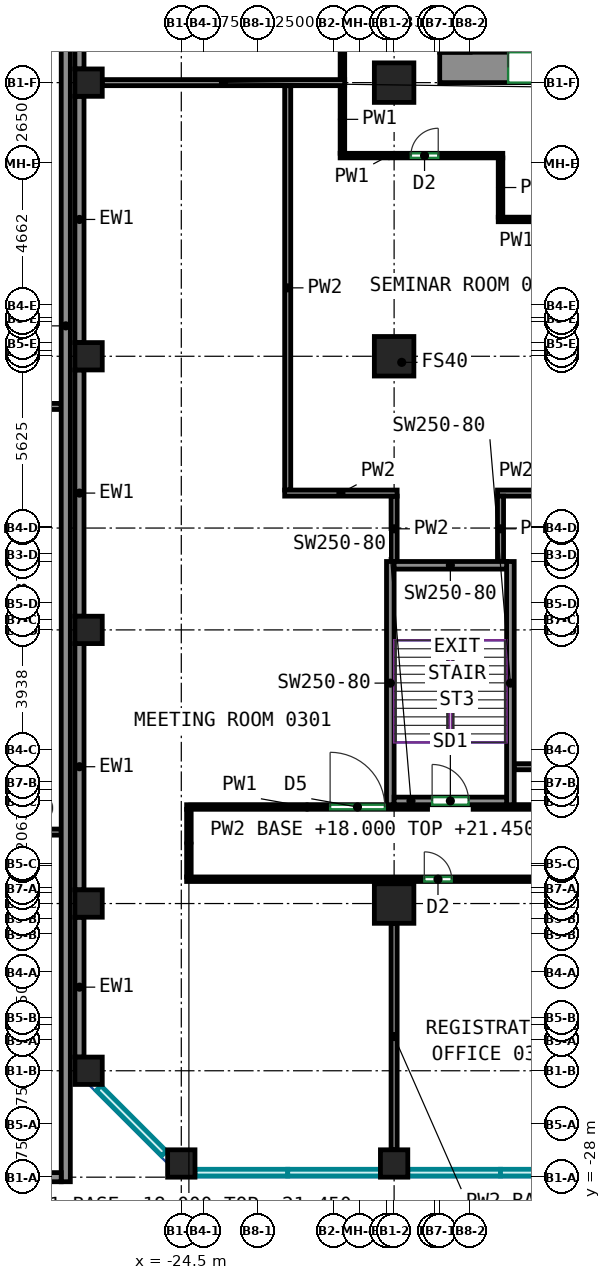
"""IFC4 building model, lengths in metres.
Left out: names, types, materials, properties, quantities, classifications, styles, units other than length and angle.
Written with IfcOpenShell. Run it as: python <this file> out.ifc"""

import sys

from ifc_helpers import new_model, si_unit, direction, frame, frame_2d, origin, origin_2d, place, context, subcontext, project, spatial, rectangle, extrude, source, transform, mapped, element, fill, save


model = new_model("IFC4")
c1 = context("Model", 3, precision=1e-05, world=origin(), true_north=direction((0.0, 1.0)))
c2 = subcontext(c1, "Body", "Model", "MODEL_VIEW")
j1 = project(units=[si_unit("LENGTHUNIT", "METRE"), si_unit("PLANEANGLEUNIT", "RADIAN")], contexts=[c1])
p1 = place(None, origin())
s1 = spatial("IfcSite", under=j1, at=p1, CompositionType="ELEMENT")
p2 = place(p1, origin())
s2 = spatial("IfcBuilding", under=s1, at=p2, CompositionType="ELEMENT")
p3 = place(p2, frame((0.0, 0.0, 18.0)))
s3 = spatial("IfcBuildingStorey", under=s2, at=p3, CompositionType="ELEMENT", Elevation=18.0)
m1 = source(origin(), c2, "Body", "SweptSolid", [
    extrude(rectangle(XDim=0.9, YDim=0.9, at=origin_2d()), origin(), (0.0, 0.0, 1.0), 4.1),
])
for number, where, z_axis, x_axis in (
    (1, (-27.55, -24.5, 0.0), (0.0, 0.0, 1.0), (1.0, 0.0, 0.0)),
    (2, (-27.55, -19.0, 0.0), (0.0, 0.0, 1.0), (1.0, 0.0, 0.0)),
    (3, (-27.55, -10.0, 0.0), (0.0, 0.0, 1.0), (1.0, 0.0, 0.0)),
    (4, (-27.55, -1.0, 0.0), (0.0, 0.0, 1.0), (1.0, 0.0, 0.0)),
    (5, (-27.55, 8.0, 0.0), (0.0, 0.0, 1.0), (1.0, 0.0, 0.0)),
    (6, (-24.5, -27.55, 0.0), (0.0, 0.0, 1.0), (1.0, 0.0, 0.0)),
    (7, (-17.5, -27.55, 0.0), (0.0, 0.0, 1.0), (1.0, 0.0, 0.0)),
):
    element("IfcColumn", number, at=place(p3, frame(where, z_axis=z_axis, x_axis=x_axis)), inside=s3, PredefinedType="COLUMN", context=c2, shape_type="MappedRepresentation", body=[
        mapped(m1, transform((0.0, 0.0, 0.0))),
    ])
m2 = source(origin(), c2, "Body", "SweptSolid", [
    extrude(rectangle(XDim=1.3, YDim=1.3, at=origin_2d()), origin(), (0.0, 0.0, 1.0), 4.1),
])
for number, where, z_axis, x_axis in (
    (8, (-17.5, -19.0, 0.0), (0.0, 0.0, 1.0), (1.0, 0.0, 0.0)),
    (9, (-17.5, -1.0, 0.0), (0.0, 0.0, 1.0), (1.0, 0.0, 0.0)),
    (10, (-17.5, 8.0, 0.0), (0.0, 0.0, 1.0), (1.0, 0.0, 0.0)),
):
    element("IfcColumn", number, at=place(p3, frame(where, z_axis=z_axis, x_axis=x_axis)), inside=s3, PredefinedType="COLUMN", context=c2, shape_type="MappedRepresentation", body=[
        mapped(m2, transform((0.0, 0.0, 0.0))),
    ])
m3 = source(origin(), c2, "Body", "SweptSolid", [
    extrude(rectangle(XDim=5.63, YDim=1.0, at=frame_2d((2.815, 0.0))), origin(), (0.0, 0.0, 1.0), 4.1),
])
p4 = place(p3, frame((-16.0, 8.5, 0.0), z_axis=(0.0, 0.0, 1.0), x_axis=(1.0, 0.0, 0.0)))
e11 = element("IfcWall", 11, at=p4, inside=s3, PredefinedType="SHEAR", context=c2, shape_type="MappedRepresentation", body=[
    mapped(m3, transform((0.0, 0.0, 0.0))),
])
p5 = place(p4, frame((2.25, 0.0, 0.0)))
e12 = element("IfcOpeningElement", 12, at=p5, cuts=e11, PredefinedType="OPENING", context=c2, shape_type="SweptSolid", body=[
    extrude(rectangle(XDim=1.2, YDim=2.1, at=frame_2d((0.6, 1.05))), frame((0.0, 0.51, 0.0), z_axis=(0.0, -1.0, 0.0), x_axis=(1.0, 0.0, 0.0)), (0.0, 0.0, 1.0), 1.02),
])
m4 = source(origin(), c2, "Body", "SweptSolid", [
    extrude(rectangle(XDim=8.0, YDim=0.25, at=frame_2d((4.0, 0.0))), origin(), (0.0, 0.0, 1.0), 4.1),
])
for number, where, z_axis, x_axis in (
    (13, (-17.625, -15.75, 0.0), (0.0, 0.0, 1.0), (0.0, 1.0, 0.0)),
    (14, (-13.675, -15.75, 0.0), (0.0, 0.0, 1.0), (0.0, 1.0, 0.0)),
):
    element("IfcWall", number, at=place(p3, frame(where, z_axis=z_axis, x_axis=x_axis)), inside=s3, PredefinedType="SHEAR", context=c2, shape_type="MappedRepresentation", body=[
        mapped(m4, transform((0.0, 0.0, 0.0))),
    ])
m5 = source(origin(), c2, "Body", "SweptSolid", [
    extrude(rectangle(XDim=3.7, YDim=0.25, at=frame_2d((1.85, 0.0))), origin(), (0.0, 0.0, 1.0), 4.1),
])
p6 = place(p3, frame((-17.5, -15.625, 0.0), z_axis=(0.0, 0.0, 1.0), x_axis=(1.0, 0.0, 0.0)))
e15 = element("IfcWall", 15, at=p6, inside=s3, PredefinedType="SHEAR", context=c2, shape_type="MappedRepresentation", body=[
    mapped(m5, transform((0.0, 0.0, 0.0))),
])
p7 = place(p6, frame((1.25, 0.0, 0.0)))
e16 = element("IfcOpeningElement", 16, at=p7, cuts=e15, PredefinedType="OPENING", context=c2, shape_type="SweptSolid", body=[
    extrude(rectangle(XDim=1.2, YDim=2.1, at=frame_2d((0.6, 1.05))), frame((0.0, 0.135, 0.0), z_axis=(0.0, -1.0, 0.0), x_axis=(1.0, 0.0, 0.0)), (0.0, 0.0, 1.0), 0.27),
])
p8 = place(p3, frame((-17.5, -7.875, 0.0), z_axis=(0.0, 0.0, 1.0), x_axis=(1.0, 0.0, 0.0)))
e17 = element("IfcWall", 17, at=p8, inside=s3, PredefinedType="SHEAR", context=c2, shape_type="MappedRepresentation", body=[
    mapped(m5, transform((0.0, 0.0, 0.0))),
])
m6 = source(origin(), c2, "Body", "SweptSolid", [
    extrude(rectangle(XDim=15.282, YDim=0.3, at=frame_2d((7.641, 0.0))), origin(), (0.0, 0.0, 1.0), 4.1),
])
p9 = place(p3, frame((-27.85, 23.732, 0.0), z_axis=(0.0, 0.0, 1.0), x_axis=(0.0, -1.0, 0.0)))
e18 = element("IfcWall", 18, at=p9, inside=s3, PredefinedType="SOLIDWALL", context=c2, shape_type="MappedRepresentation", body=[
    mapped(m6, transform((0.0, 0.0, 0.0))),
])
m7 = source(origin(), c2, "Body", "SweptSolid", [
    extrude(rectangle(XDim=8.1, YDim=0.3, at=frame_2d((4.05, 0.0))), origin(), (0.0, 0.0, 1.0), 4.1),
])
for number, where, z_axis, x_axis in (
    (19, (-27.85, 7.55, 0.0), (0.0, 0.0, 1.0), (0.0, -1.0, 0.0)),
    (20, (-27.85, -1.45, 0.0), (0.0, 0.0, 1.0), (0.0, -1.0, 0.0)),
    (21, (-27.85, -10.45, 0.0), (0.0, 0.0, 1.0), (0.0, -1.0, 0.0)),
):
    element("IfcWall", number, at=place(p3, frame(where, z_axis=z_axis, x_axis=x_axis)), inside=s3, PredefinedType="SOLIDWALL", context=c2, shape_type="MappedRepresentation", body=[
        mapped(m7, transform((0.0, 0.0, 0.0))),
    ])
m8 = source(origin(), c2, "Body", "SweptSolid", [
    extrude(rectangle(XDim=4.6, YDim=0.3, at=frame_2d((2.3, 0.0))), origin(), (0.0, 0.0, 1.0), 4.1),
])
p10 = place(p3, frame((-27.85, -19.45, 0.0), z_axis=(0.0, 0.0, 1.0), x_axis=(0.0, -1.0, 0.0)))
e22 = element("IfcWall", 22, at=p10, inside=s3, PredefinedType="SOLIDWALL", context=c2, shape_type="MappedRepresentation", body=[
    mapped(m8, transform((0.0, 0.0, 0.0))),
])
m9 = source(origin(), c2, "Body", "SweptSolid", [
    extrude(rectangle(XDim=56.3, YDim=0.3, at=frame_2d((28.15, 0.0))), origin(), (0.0, 0.0, 1.0), 4.1),
])
p11 = place(p3, frame((-28.3, 28.15, 0.0), z_axis=(0.0, 0.0, 1.0), x_axis=(0.0, -1.0, 0.0)))
e23 = element("IfcWall", 23, at=p11, inside=s3, PredefinedType="SOLIDWALL", context=c2, shape_type="MappedRepresentation", body=[
    mapped(m9, transform((0.0, 0.0, 0.0))),
])
m10 = source(origin(), c2, "Body", "SweptSolid", [
    extrude(rectangle(XDim=8.0, YDim=0.3, at=frame_2d((4.0, 0.0))), origin(), (0.0, 0.0, 1.0), 4.1),
])
p12 = place(p3, frame((-28.45, -28.0, 0.0), z_axis=(0.0, 0.0, 1.0), x_axis=(-1.0, 0.0, 0.0)))
e24 = element("IfcWall", 24, at=p12, inside=s3, PredefinedType="SOLIDWALL", context=c2, shape_type="MappedRepresentation", body=[
    mapped(m10, transform((0.0, 0.0, 0.0))),
])
p13 = place(p12, frame((2.8, 0.0, 0.9)))
e25 = element("IfcOpeningElement", 25, at=p13, cuts=e24, PredefinedType="OPENING", context=c2, shape_type="SweptSolid", body=[
    extrude(rectangle(XDim=2.4, YDim=1.8, at=frame_2d((1.2, 0.9))), frame((0.0, 0.16, 0.0), z_axis=(0.0, -1.0, 0.0), x_axis=(1.0, 0.0, 0.0)), (0.0, 0.0, 1.0), 0.32),
])
p14 = place(p3, frame((-14.075, 3.5, 0.0), z_axis=(0.0, 0.0, 1.0), x_axis=(1.0, 0.0, 0.0)))
e26 = element("IfcWall", 26, at=p14, inside=s3, PredefinedType="PARTITIONING", context=c2, shape_type="SweptSolid", body=[
    extrude(rectangle(XDim=3.65, YDim=0.15, at=frame_2d((1.825, 0.0))), origin(), (0.0, 0.0, 1.0), 4.1),
])
p15 = place(p3, frame((-14.0, 5.525, 0.0), z_axis=(0.0, 0.0, 1.0), x_axis=(0.0, -1.0, 0.0)))
e27 = element("IfcWall", 27, at=p15, inside=s3, PredefinedType="PARTITIONING", context=c2, shape_type="SweptSolid", body=[
    extrude(rectangle(XDim=1.95, YDim=0.15, at=frame_2d((0.975, 0.0))), origin(), (0.0, 0.0, 1.0), 4.1),
])
p16 = place(p3, frame((-19.275, 5.6, 0.0), z_axis=(0.0, 0.0, 1.0), x_axis=(1.0, 0.0, 0.0)))
e28 = element("IfcWall", 28, at=p16, inside=s3, PredefinedType="PARTITIONING", context=c2, shape_type="SweptSolid", body=[
    extrude(rectangle(XDim=5.35, YDim=0.15, at=frame_2d((2.675, 0.0))), origin(), (0.0, 0.0, 1.0), 4.1),
])
p17 = place(p16, frame((2.326, 0.0, 0.0)))
e29 = element("IfcOpeningElement", 29, at=p17, cuts=e28, PredefinedType="OPENING", context=c2, shape_type="SweptSolid", body=[
    extrude(rectangle(XDim=0.9, YDim=2.1, at=frame_2d((0.45, 1.05))), frame((0.0, 0.085, 0.0), z_axis=(0.0, -1.0, 0.0), x_axis=(1.0, 0.0, 0.0)), (0.0, 0.0, 1.0), 0.17),
])
p18 = place(p3, frame((-19.2, 5.675, 0.0), z_axis=(0.0, 0.0, 1.0), x_axis=(0.0, 1.0, 0.0)))
e30 = element("IfcWall", 30, at=p18, inside=s3, PredefinedType="PARTITIONING", context=c2, shape_type="SweptSolid", body=[
    extrude(rectangle(XDim=2.235, YDim=0.15, at=frame_2d((1.117, 0.0))), origin(), (0.0, 0.0, 1.0), 4.1),
])
p19 = place(p3, frame((-24.325, -18.2, 0.0), z_axis=(0.0, 0.0, 1.0), x_axis=(1.0, 0.0, 0.0)))
e31 = element("IfcWall", 31, at=p19, inside=s3, PredefinedType="PARTITIONING", context=c2, shape_type="SweptSolid", body=[
    extrude(rectangle(XDim=48.65, YDim=0.15, at=frame_2d((24.325, 0.0))), origin(), (0.0, 0.0, 1.0), 4.1),
])
p20 = place(p19, frame((7.818, 0.0, 0.0)))
e32 = element("IfcOpeningElement", 32, at=p20, cuts=e31, PredefinedType="OPENING", context=c2, shape_type="SweptSolid", body=[
    extrude(rectangle(XDim=0.9, YDim=2.1, at=frame_2d((0.45, 1.05))), frame((0.0, 0.085, 0.0), z_axis=(0.0, -1.0, 0.0), x_axis=(1.0, 0.0, 0.0)), (0.0, 0.0, 1.0), 0.17),
])
p21 = place(p19, frame((28.526, 0.0, 0.0)))
e33 = element("IfcOpeningElement", 33, at=p21, cuts=e31, PredefinedType="OPENING", context=c2, shape_type="SweptSolid", body=[
    extrude(rectangle(XDim=1.8, YDim=2.1, at=frame_2d((0.9, 1.05))), frame((0.0, 0.085, 0.0), z_axis=(0.0, -1.0, 0.0), x_axis=(1.0, 0.0, 0.0)), (0.0, 0.0, 1.0), 0.17),
])
p22 = place(p19, frame((44.531, 0.0, 0.0)))
e34 = element("IfcOpeningElement", 34, at=p22, cuts=e31, PredefinedType="OPENING", context=c2, shape_type="SweptSolid", body=[
    extrude(rectangle(XDim=0.9, YDim=2.1, at=frame_2d((0.45, 1.05))), frame((0.0, 0.085, 0.0), z_axis=(0.0, -1.0, 0.0), x_axis=(1.0, 0.0, 0.0)), (0.0, 0.0, 1.0), 0.17),
])
p23 = place(p3, frame((-24.25, -15.9, 0.0), z_axis=(0.0, 0.0, 1.0), x_axis=(0.0, -1.0, 0.0)))
e35 = element("IfcWall", 35, at=p23, inside=s3, PredefinedType="PARTITIONING", context=c2, shape_type="SweptSolid", body=[
    extrude(rectangle(XDim=2.225, YDim=0.15, at=frame_2d((1.113, 0.0))), origin(), (0.0, 0.0, 1.0), 3.45),
])
p24 = place(p3, frame((-14.9, -15.825, 0.0), z_axis=(0.0, 0.0, 1.0), x_axis=(1.0, 0.0, 0.0)))
e36 = element("IfcWall", 36, at=p24, inside=s3, PredefinedType="PARTITIONING", context=c2, shape_type="SweptSolid", body=[
    extrude(rectangle(XDim=6.775, YDim=0.15, at=frame_2d((3.387, 0.0))), origin(), (0.0, 0.0, 1.0), 4.1),
])
p25 = place(p24, frame((3.841, 0.0, 0.0)))
e37 = element("IfcOpeningElement", 37, at=p25, cuts=e36, PredefinedType="OPENING", context=c2, shape_type="SweptSolid", body=[
    extrude(rectangle(XDim=0.9, YDim=2.1, at=frame_2d((0.45, 1.05))), frame((0.0, 0.085, 0.0), z_axis=(0.0, -1.0, 0.0), x_axis=(1.0, 0.0, 0.0)), (0.0, 0.0, 1.0), 0.17),
])
p26 = place(p3, frame((-24.325, -15.825, 0.0), z_axis=(0.0, 0.0, 1.0), x_axis=(1.0, 0.0, 0.0)))
e38 = element("IfcWall", 38, at=p26, inside=s3, PredefinedType="PARTITIONING", context=c2, shape_type="SweptSolid", body=[
    extrude(rectangle(XDim=7.925, YDim=0.15, at=frame_2d((3.962, 0.0))), origin(), (0.0, 0.0, 1.0), 4.1),
])
p27 = place(p26, frame((4.72, 0.0, 0.0)))
e39 = element("IfcOpeningElement", 39, at=p27, cuts=e38, PredefinedType="OPENING", context=c2, shape_type="SweptSolid", body=[
    extrude(rectangle(XDim=1.8, YDim=2.1, at=frame_2d((0.9, 1.05))), frame((0.0, 0.085, 0.0), z_axis=(0.0, -1.0, 0.0), x_axis=(1.0, 0.0, 0.0)), (0.0, 0.0, 1.0), 0.17),
])
p28 = place(p3, frame((-19.2, 8.09, 0.0), z_axis=(0.0, 0.0, 1.0), x_axis=(0.0, 1.0, 0.0)))
e40 = element("IfcWall", 40, at=p28, inside=s3, PredefinedType="PARTITIONING", context=c2, shape_type="SweptSolid", body=[
    extrude(rectangle(XDim=16.335, YDim=0.15, at=frame_2d((8.167, 0.0))), origin(), (0.0, 0.0, 1.0), 4.1),
])
p29 = place(p28, frame((8.72, 0.0, 0.0)))
e41 = element("IfcOpeningElement", 41, at=p29, cuts=e40, PredefinedType="OPENING", context=c2, shape_type="SweptSolid", body=[
    extrude(rectangle(XDim=0.9, YDim=2.1, at=frame_2d((0.45, 1.05))), frame((0.0, 0.085, 0.0), z_axis=(0.0, -1.0, 0.0), x_axis=(1.0, 0.0, 0.0)), (0.0, 0.0, 1.0), 0.17),
])
p30 = place(p3, frame((-21.0, 7.9, 0.0), z_axis=(0.0, 0.0, 1.0), x_axis=(0.0, -1.0, 0.0)))
e42 = element("IfcWall", 42, at=p30, inside=s3, PredefinedType="PARTITIONING", context=c2, shape_type="SweptSolid", body=[
    extrude(rectangle(XDim=13.3, YDim=0.2, at=frame_2d((6.65, 0.0))), origin(), (0.0, 0.0, 1.0), 4.1),
])
p31 = place(p3, frame((-17.5, -7.75, 0.0), z_axis=(0.0, 0.0, 1.0), x_axis=(0.0, 1.0, 0.0)))
e43 = element("IfcWall", 43, at=p31, inside=s3, PredefinedType="PARTITIONING", context=c2, shape_type="SweptSolid", body=[
    extrude(rectangle(XDim=2.15, YDim=0.2, at=frame_2d((1.075, 0.0))), origin(), (0.0, 0.0, 1.0), 4.1),
])
p32 = place(p3, frame((-21.1, -5.5, 0.0), z_axis=(0.0, 0.0, 1.0), x_axis=(1.0, 0.0, 0.0)))
e44 = element("IfcWall", 44, at=p32, inside=s3, PredefinedType="PARTITIONING", context=c2, shape_type="SweptSolid", body=[
    extrude(rectangle(XDim=3.7, YDim=0.2, at=frame_2d((1.85, 0.0))), origin(), (0.0, 0.0, 1.0), 4.1),
])
p33 = place(p3, frame((-14.1, -5.5, 0.0), z_axis=(0.0, 0.0, 1.0), x_axis=(1.0, 0.0, 0.0)))
e45 = element("IfcWall", 45, at=p33, inside=s3, PredefinedType="PARTITIONING", context=c2, shape_type="SweptSolid", body=[
    extrude(rectangle(XDim=3.674, YDim=0.2, at=frame_2d((1.837, 0.0))), origin(), (0.0, 0.0, 1.0), 4.1),
])
p34 = place(p3, frame((-14.0, -7.75, 0.0), z_axis=(0.0, 0.0, 1.0), x_axis=(0.0, 1.0, 0.0)))
e46 = element("IfcWall", 46, at=p34, inside=s3, PredefinedType="PARTITIONING", context=c2, shape_type="SweptSolid", body=[
    extrude(rectangle(XDim=2.15, YDim=0.2, at=frame_2d((1.075, 0.0))), origin(), (0.0, 0.0, 1.0), 4.1),
])
p35 = place(p3, frame((-17.5, -27.1, 0.0), z_axis=(0.0, 0.0, 1.0), x_axis=(0.0, 1.0, 0.0)))
e47 = element("IfcWall", 47, at=p35, inside=s3, PredefinedType="PARTITIONING", context=c2, shape_type="SweptSolid", body=[
    extrude(rectangle(XDim=7.45, YDim=0.2, at=frame_2d((3.725, 0.0))), origin(), (0.0, 0.0, 1.0), 3.45),
])
p36 = place(p3, frame((-27.1, 8.0, 0.0), z_axis=(0.0, 0.0, 1.0), x_axis=(1.0, 0.0, 0.0)))
e48 = element("IfcWall", 48, at=p36, inside=s3, PredefinedType="PARTITIONING", context=c2, shape_type="SweptSolid", body=[
    extrude(rectangle(XDim=7.974, YDim=0.2, at=frame_2d((3.987, 0.0))), origin(), (0.0, 0.0, 1.0), 3.45),
])
p37 = place(p3, frame((-13.55, -14.5, 0.0), z_axis=(0.0, 0.0, 1.0), x_axis=(1.0, 0.0, 0.0)))
e49 = element("IfcWall", 49, at=p37, inside=s3, PredefinedType="PARTITIONING", context=c2, shape_type="SweptSolid", body=[
    extrude(rectangle(XDim=2.95, YDim=0.2, at=frame_2d((1.475, 0.0))), origin(), (0.0, 0.0, 1.0), 4.1),
])
m11 = source(origin(), c2, "Body", "SweptSolid", [
    extrude(rectangle(XDim=10.1, YDim=0.2, at=frame_2d((5.05, 0.0))), origin(), (0.0, 0.0, 1.0), 3.3),
])
p38 = place(p3, frame((-38.55, -2.65, 0.0), z_axis=(0.0, 0.0, 1.0), x_axis=(1.0, 0.0, 0.0)))
e50 = element("IfcWall", 50, at=p38, inside=s3, PredefinedType="PARTITIONING", context=c2, shape_type="MappedRepresentation", body=[
    mapped(m11, transform((0.0, 0.0, 0.0))),
])
m12 = source(origin(), c2, "Body", "SweptSolid", [
    extrude(rectangle(XDim=4.85, YDim=0.2, at=frame_2d((2.425, 0.0))), origin(), (0.0, 0.0, 1.0), 3.3),
])
p39 = place(p3, frame((-33.3, -16.65, 0.0), z_axis=(0.0, 0.0, 1.0), x_axis=(1.0, 0.0, 0.0)))
e51 = element("IfcWall", 51, at=p39, inside=s3, PredefinedType="PARTITIONING", context=c2, shape_type="MappedRepresentation", body=[
    mapped(m12, transform((0.0, 0.0, 0.0))),
])
p40 = place(p5, origin())
e52 = element("IfcDoor", 52, at=p40, inside=s3, OperationType="DOUBLE_DOOR_SINGLE_SWING", PredefinedType="DOOR", context=c2, shape_type="SweptSolid", body=[
    extrude(rectangle(XDim=1.2, YDim=2.1, at=frame_2d((0.6, 1.05))), frame((0.0, 0.405, 0.0), z_axis=(0.0, -1.0, 0.0), x_axis=(1.0, 0.0, 0.0)), (0.0, 0.0, 1.0), 0.05),
])
fill(e12, e52)
p41 = place(p7, origin())
e53 = element("IfcDoor", 53, at=p41, inside=s3, OperationType="DOUBLE_DOOR_SINGLE_SWING", PredefinedType="DOOR", context=c2, shape_type="SweptSolid", body=[
    extrude(rectangle(XDim=1.2, YDim=2.1, at=frame_2d((0.6, 1.05))), frame((0.0, 0.025, 0.0), z_axis=(0.0, -1.0, 0.0), x_axis=(1.0, 0.0, 0.0)), (0.0, 0.0, 1.0), 0.05),
])
fill(e16, e53)
p42 = place(p20, origin())
e54 = element("IfcDoor", 54, at=p42, inside=s3, OperationType="SINGLE_SWING_LEFT", PredefinedType="DOOR", context=c2, shape_type="SweptSolid", body=[
    extrude(rectangle(XDim=0.9, YDim=2.1, at=frame_2d((0.45, 1.05))), frame((0.0, 0.025, 0.0), z_axis=(0.0, -1.0, 0.0), x_axis=(1.0, 0.0, 0.0)), (0.0, 0.0, 1.0), 0.05),
])
fill(e32, e54)
p43 = place(p27, origin())
e55 = element("IfcDoor", 55, at=p43, inside=s3, OperationType="DOUBLE_DOOR_SINGLE_SWING", PredefinedType="DOOR", context=c2, shape_type="SweptSolid", body=[
    extrude(rectangle(XDim=1.8, YDim=2.1, at=frame_2d((0.9, 1.05))), frame((0.0, 0.025, 0.0), z_axis=(0.0, -1.0, 0.0), x_axis=(1.0, 0.0, 0.0)), (0.0, 0.0, 1.0), 0.05),
])
fill(e39, e55)
p44 = place(p17, origin())
e56 = element("IfcDoor", 56, at=p44, inside=s3, OperationType="SINGLE_SWING_RIGHT", PredefinedType="DOOR", context=c2, shape_type="SweptSolid", body=[
    extrude(rectangle(XDim=0.9, YDim=2.1, at=frame_2d((0.45, 1.05))), frame((0.0, 0.025, 0.0), z_axis=(0.0, -1.0, 0.0), x_axis=(1.0, 0.0, 0.0)), (0.0, 0.0, 1.0), 0.05),
])
fill(e29, e56)
save(model, sys.argv[1])
